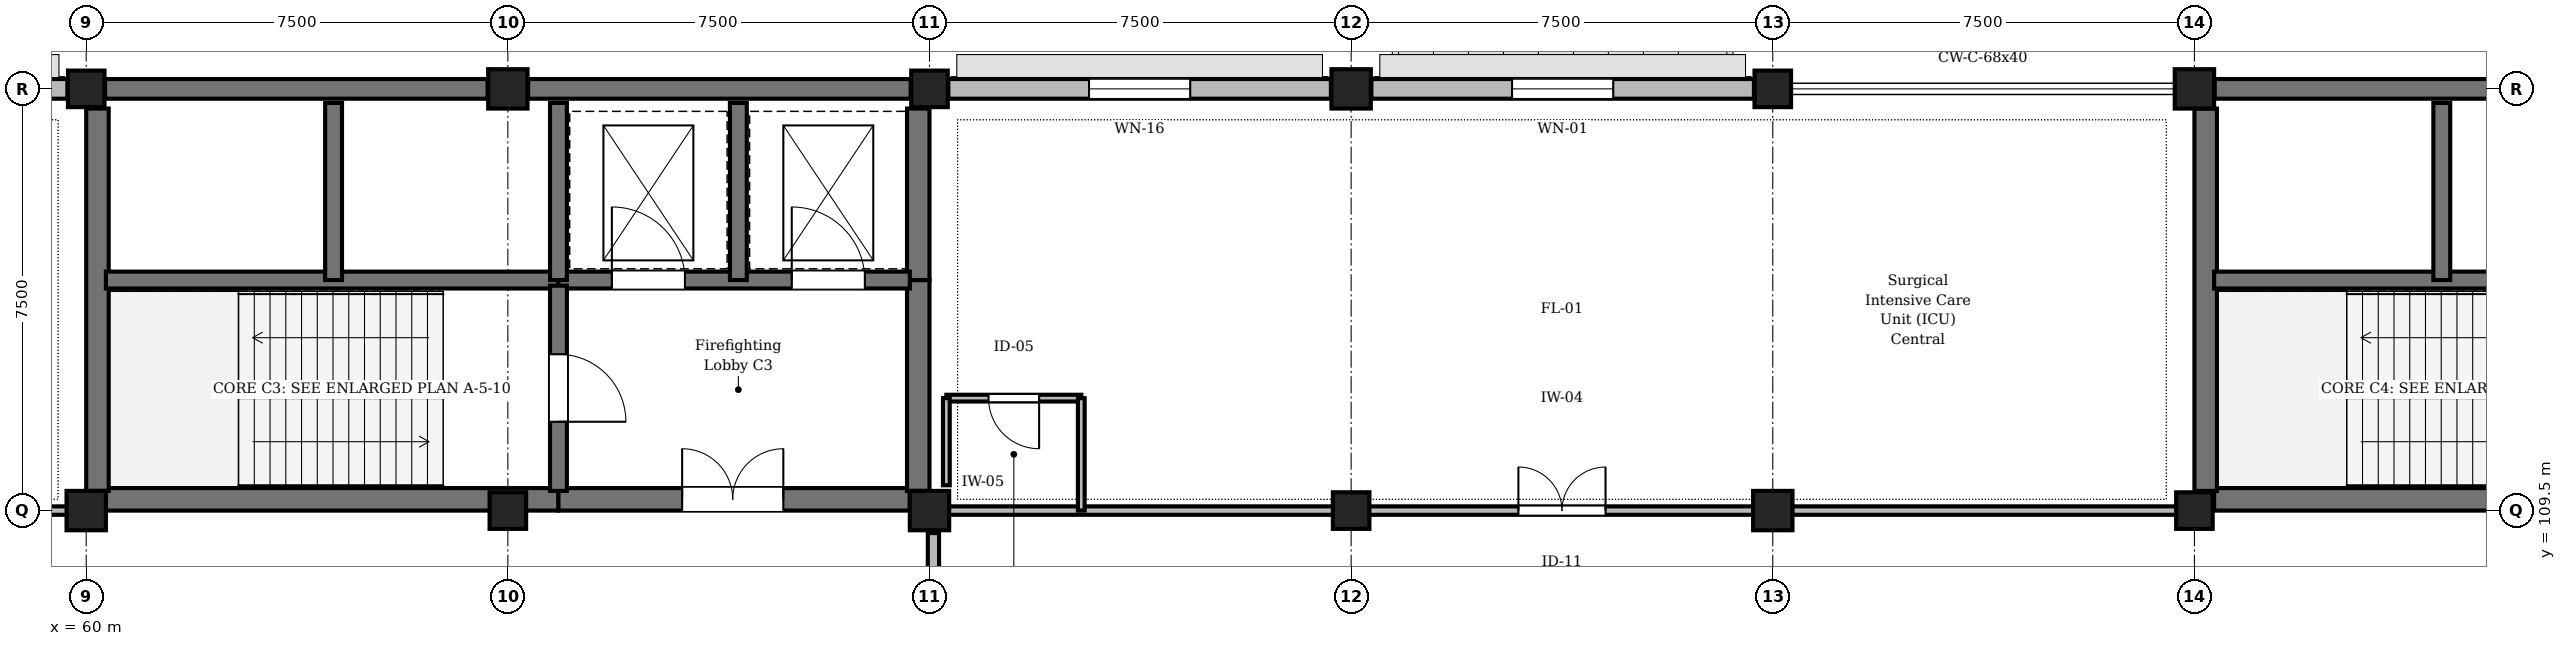
"""IFC4 building model, lengths in metres.
Left out: names, types, materials, properties, quantities, classifications, styles, units other than length and angle.
Written with IfcOpenShell. Run it as: python <this file> out.ifc"""

import sys

from ifc_helpers import new_model, si_unit, direction, frame, frame_2d, origin, origin_2d, place, context, subcontext, project, spatial, rectangle, extrude, element, fill, save


model = new_model("IFC4")
c1 = context("Model", 3, precision=1e-05, world=origin(), true_north=direction((0.0, 1.0)))
c2 = subcontext(c1, "Body", "Model", "MODEL_VIEW")
j1 = project(units=[si_unit("LENGTHUNIT", "METRE"), si_unit("PLANEANGLEUNIT", "RADIAN")], contexts=[c1])
p1 = place(None, origin())
s1 = spatial("IfcSite", under=j1, at=p1, CompositionType="ELEMENT")
p2 = place(p1, origin())
s2 = spatial("IfcBuilding", under=s1, at=p2, CompositionType="ELEMENT")
p3 = place(p2, frame((0.0, 0.0, 9.3)))
s3 = spatial("IfcBuildingStorey", under=s2, at=p3, CompositionType="ELEMENT", Elevation=9.3)
p4 = place(p3, frame((60.0, 109.5, 0.0), z_axis=(0.0, 0.0, 1.0), x_axis=(1.0, 0.0, 0.0)))
e1 = element("IfcColumn", 1, at=p4, inside=s3, PredefinedType="COLUMN", context=c2, shape_type="SweptSolid", body=[
    extrude(rectangle(XDim=0.7, YDim=0.7, at=origin_2d()), origin(), (0.0, 0.0, 1.0), 4.8),
])
for number, where, z_axis, x_axis in (
    (2, (60.0, 117.0, 0.0), (0.0, 0.0, 1.0), (1.0, 0.0, 0.0)),
    (3, (67.5, 109.5, 0.0), (0.0, 0.0, 1.0), (1.0, 0.0, 0.0)),
):
    element("IfcColumn", number, at=place(p3, frame(where, z_axis=z_axis, x_axis=x_axis)), inside=s3, PredefinedType="COLUMN", context=c2, shape_type="SweptSolid", body=[
        extrude(rectangle(XDim=0.65, YDim=0.65, at=origin_2d()), origin(), (0.0, 0.0, 1.0), 4.8),
    ])
for number, where, z_axis, x_axis in (
    (4, (67.5, 117.0, 0.0), (0.0, 0.0, 1.0), (1.0, 0.0, 0.0)),
    (5, (75.0, 109.5, 0.0), (0.0, 0.0, 1.0), (1.0, 0.0, 0.0)),
):
    element("IfcColumn", number, at=place(p3, frame(where, z_axis=z_axis, x_axis=x_axis)), inside=s3, PredefinedType="COLUMN", context=c2, shape_type="SweptSolid", body=[
        extrude(rectangle(XDim=0.7, YDim=0.7, at=origin_2d()), origin(), (0.0, 0.0, 1.0), 4.8),
    ])
for number, where, z_axis, x_axis in (
    (6, (75.0, 117.0, 0.0), (0.0, 0.0, 1.0), (1.0, 0.0, 0.0)),
    (7, (82.5, 109.5, 0.0), (0.0, 0.0, 1.0), (1.0, 0.0, 0.0)),
):
    element("IfcColumn", number, at=place(p3, frame(where, z_axis=z_axis, x_axis=x_axis)), inside=s3, PredefinedType="COLUMN", context=c2, shape_type="SweptSolid", body=[
        extrude(rectangle(XDim=0.65, YDim=0.65, at=origin_2d()), origin(), (0.0, 0.0, 1.0), 4.8),
    ])
for number, where, z_axis, x_axis in (
    (8, (82.5, 117.0, 0.0), (0.0, 0.0, 1.0), (1.0, 0.0, 0.0)),
    (9, (90.0, 109.5, 0.0), (0.0, 0.0, 1.0), (1.0, 0.0, 0.0)),
):
    element("IfcColumn", number, at=place(p3, frame(where, z_axis=z_axis, x_axis=x_axis)), inside=s3, PredefinedType="COLUMN", context=c2, shape_type="SweptSolid", body=[
        extrude(rectangle(XDim=0.7, YDim=0.7, at=origin_2d()), origin(), (0.0, 0.0, 1.0), 4.8),
    ])
for number, where, z_axis, x_axis in (
    (10, (90.0, 117.0, 0.0), (0.0, 0.0, 1.0), (1.0, 0.0, 0.0)),
    (11, (97.5, 109.5, 0.0), (0.0, 0.0, 1.0), (1.0, 0.0, 0.0)),
):
    element("IfcColumn", number, at=place(p3, frame(where, z_axis=z_axis, x_axis=x_axis)), inside=s3, PredefinedType="COLUMN", context=c2, shape_type="SweptSolid", body=[
        extrude(rectangle(XDim=0.65, YDim=0.65, at=origin_2d()), origin(), (0.0, 0.0, 1.0), 4.8),
    ])
p5 = place(p3, frame((97.5, 117.0, 0.0), z_axis=(0.0, 0.0, 1.0), x_axis=(1.0, 0.0, 0.0)))
e12 = element("IfcColumn", 12, at=p5, inside=s3, PredefinedType="COLUMN", context=c2, shape_type="SweptSolid", body=[
    extrude(rectangle(XDim=0.7, YDim=0.7, at=origin_2d()), origin(), (0.0, 0.0, 1.0), 4.8),
])
p6 = place(p3, frame((52.81, 117.0, 0.0), z_axis=(0.0, 0.0, 1.0), x_axis=(1.0, 0.0, 0.0)))
e13 = element("IfcWall", 13, at=p6, inside=s3, PredefinedType="STANDARD", context=c2, shape_type="SweptSolid", body=[
    extrude(rectangle(XDim=6.855, YDim=0.35, at=frame_2d((3.427, 0.0))), origin(), (0.0, 0.0, 1.0), 3.95),
])
p7 = place(p6, frame((2.327, 0.0, 0.9)))
e14 = element("IfcOpeningElement", 14, at=p7, cuts=e13, PredefinedType="OPENING", context=c2, shape_type="SweptSolid", body=[
    extrude(rectangle(XDim=2.2, YDim=1.95, at=frame_2d((1.1, 0.975))), frame((0.0, 0.185, 0.0), z_axis=(0.0, -1.0, 0.0), x_axis=(1.0, 0.0, 0.0)), (0.0, 0.0, 1.0), 0.37),
])
for number, where, z_axis, x_axis in (
    (15, (60.335, 117.0, 0.0), (0.0, 0.0, 1.0), (1.0, 0.0, 0.0)),
    (16, (67.86, 117.0, 0.0), (0.0, 0.0, 1.0), (1.0, 0.0, 0.0)),
):
    element("IfcWall", number, at=place(p3, frame(where, z_axis=z_axis, x_axis=x_axis)), inside=s3, PredefinedType="SHEAR", context=c2, shape_type="SweptSolid", body=[
        extrude(rectangle(XDim=6.805, YDim=0.35, at=frame_2d((3.402, 0.0))), origin(), (0.0, 0.0, 1.0), 4.55),
    ])
p8 = place(p3, frame((75.335, 117.0, 0.0), z_axis=(0.0, 0.0, 1.0), x_axis=(1.0, 0.0, 0.0)))
e17 = element("IfcWall", 17, at=p8, inside=s3, PredefinedType="STANDARD", context=c2, shape_type="SweptSolid", body=[
    extrude(rectangle(XDim=6.805, YDim=0.35, at=frame_2d((3.402, 0.0))), origin(), (0.0, 0.0, 1.0), 3.95),
])
p9 = place(p8, frame((2.502, 0.0, 0.9)))
e18 = element("IfcOpeningElement", 18, at=p9, cuts=e17, PredefinedType="OPENING", context=c2, shape_type="SweptSolid", body=[
    extrude(rectangle(XDim=1.8, YDim=1.8, at=frame_2d((0.9, 0.9))), frame((0.0, 0.185, 0.0), z_axis=(0.0, -1.0, 0.0), x_axis=(1.0, 0.0, 0.0)), (0.0, 0.0, 1.0), 0.37),
])
p10 = place(p3, frame((82.86, 117.0, 0.0), z_axis=(0.0, 0.0, 1.0), x_axis=(1.0, 0.0, 0.0)))
e19 = element("IfcWall", 19, at=p10, inside=s3, PredefinedType="STANDARD", context=c2, shape_type="SweptSolid", body=[
    extrude(rectangle(XDim=6.805, YDim=0.35, at=frame_2d((3.402, 0.0))), origin(), (0.0, 0.0, 1.0), 3.95),
])
p11 = place(p10, frame((2.502, 0.0, 0.9)))
e20 = element("IfcOpeningElement", 20, at=p11, cuts=e19, PredefinedType="OPENING", context=c2, shape_type="SweptSolid", body=[
    extrude(rectangle(XDim=1.8, YDim=2.4, at=frame_2d((0.9, 1.2))), frame((0.0, 0.185, 0.0), z_axis=(0.0, -1.0, 0.0), x_axis=(1.0, 0.0, 0.0)), (0.0, 0.0, 1.0), 0.37),
])
p12 = place(p3, frame((97.86, 117.0, 0.0), z_axis=(0.0, 0.0, 1.0), x_axis=(1.0, 0.0, 0.0)))
e21 = element("IfcWall", 21, at=p12, inside=s3, PredefinedType="SHEAR", context=c2, shape_type="SweptSolid", body=[
    extrude(rectangle(XDim=6.805, YDim=0.35, at=frame_2d((3.402, 0.0))), origin(), (0.0, 0.0, 1.0), 4.55),
])
p13 = place(p3, frame((60.35, 109.7, 0.0), z_axis=(0.0, 0.0, 1.0), x_axis=(1.0, 0.0, 0.0)))
e22 = element("IfcWall", 22, at=p13, inside=s3, PredefinedType="SHEAR", context=c2, shape_type="SweptSolid", body=[
    extrude(rectangle(XDim=8.05, YDim=0.4, at=frame_2d((4.025, 0.0))), origin(), (0.0, 0.0, 1.0), 4.55),
])
p14 = place(p3, frame((68.4, 109.7, 0.0), z_axis=(0.0, 0.0, 1.0), x_axis=(1.0, 0.0, 0.0)))
e23 = element("IfcWall", 23, at=p14, inside=s3, PredefinedType="SHEAR", context=c2, shape_type="SweptSolid", body=[
    extrude(rectangle(XDim=6.25, YDim=0.4, at=frame_2d((3.125, 0.0))), origin(), (0.0, 0.0, 1.0), 4.55),
])
p15 = place(p14, frame((2.2, 0.0, 0.0)))
e24 = element("IfcOpeningElement", 24, at=p15, cuts=e23, PredefinedType="OPENING", context=c2, shape_type="SweptSolid", body=[
    extrude(rectangle(XDim=1.8, YDim=2.25, at=frame_2d((0.9, 1.125))), frame((0.0, 0.21, 0.0), z_axis=(0.0, -1.0, 0.0), x_axis=(1.0, 0.0, 0.0)), (0.0, 0.0, 1.0), 0.42),
])
p16 = place(p3, frame((60.2, 109.85, 0.0), z_axis=(0.0, 0.0, 1.0), x_axis=(0.0, 1.0, 0.0)))
e25 = element("IfcWall", 25, at=p16, inside=s3, PredefinedType="SHEAR", context=c2, shape_type="SweptSolid", body=[
    extrude(rectangle(XDim=6.8, YDim=0.4, at=frame_2d((3.4, 0.0))), origin(), (0.0, 0.0, 1.0), 4.55),
])
p17 = place(p3, frame((74.8, 109.85, 0.0), z_axis=(0.0, 0.0, 1.0), x_axis=(0.0, 1.0, 0.0)))
e26 = element("IfcWall", 26, at=p17, inside=s3, PredefinedType="SHEAR", context=c2, shape_type="SweptSolid", body=[
    extrude(rectangle(XDim=3.75, YDim=0.4, at=frame_2d((1.875, 0.0))), origin(), (0.0, 0.0, 1.0), 4.55),
])
p18 = place(p3, frame((74.8, 113.6, 0.0), z_axis=(0.0, 0.0, 1.0), x_axis=(0.0, 1.0, 0.0)))
e27 = element("IfcWall", 27, at=p18, inside=s3, PredefinedType="SHEAR", context=c2, shape_type="SweptSolid", body=[
    extrude(rectangle(XDim=3.05, YDim=0.4, at=frame_2d((1.525, 0.0))), origin(), (0.0, 0.0, 1.0), 4.55),
])
p19 = place(p3, frame((60.35, 113.6, 0.0), z_axis=(0.0, 0.0, 1.0), x_axis=(1.0, 0.0, 0.0)))
e28 = element("IfcWall", 28, at=p19, inside=s3, PredefinedType="SHEAR", context=c2, shape_type="SweptSolid", body=[
    extrude(rectangle(XDim=8.05, YDim=0.3, at=frame_2d((4.025, 0.0))), origin(), (0.0, 0.0, 1.0), 4.55),
])
p20 = place(p3, frame((68.4, 113.6, 0.0), z_axis=(0.0, 0.0, 1.0), x_axis=(1.0, 0.0, 0.0)))
e29 = element("IfcWall", 29, at=p20, inside=s3, PredefinedType="SHEAR", context=c2, shape_type="SweptSolid", body=[
    extrude(rectangle(XDim=6.25, YDim=0.3, at=frame_2d((3.125, 0.0))), origin(), (0.0, 0.0, 1.0), 4.55),
])
p21 = place(p20, frame((0.95, 0.0, 0.0)))
e30 = element("IfcOpeningElement", 30, at=p21, cuts=e29, PredefinedType="OPENING", context=c2, shape_type="SweptSolid", body=[
    extrude(rectangle(XDim=1.3, YDim=2.2, at=frame_2d((0.65, 1.1))), frame((0.0, 0.16, 0.0), z_axis=(0.0, -1.0, 0.0), x_axis=(1.0, 0.0, 0.0)), (0.0, 0.0, 1.0), 0.32),
])
p22 = place(p20, frame((4.15, 0.0, 0.0)))
e31 = element("IfcOpeningElement", 31, at=p22, cuts=e29, PredefinedType="OPENING", context=c2, shape_type="SweptSolid", body=[
    extrude(rectangle(XDim=1.3, YDim=2.2, at=frame_2d((0.65, 1.1))), frame((0.0, 0.16, 0.0), z_axis=(0.0, -1.0, 0.0), x_axis=(1.0, 0.0, 0.0)), (0.0, 0.0, 1.0), 0.32),
])
p23 = place(p3, frame((68.4, 113.5, 0.0), z_axis=(0.0, 0.0, 1.0), x_axis=(0.0, -1.0, 0.0)))
e32 = element("IfcWall", 32, at=p23, inside=s3, PredefinedType="SHEAR", context=c2, shape_type="SweptSolid", body=[
    extrude(rectangle(XDim=3.65, YDim=0.3, at=frame_2d((1.825, 0.0))), origin(), (0.0, 0.0, 1.0), 4.55),
])
p24 = place(p23, frame((1.22, 0.0, 0.0)))
e33 = element("IfcOpeningElement", 33, at=p24, cuts=e32, PredefinedType="OPENING", context=c2, shape_type="SweptSolid", body=[
    extrude(rectangle(XDim=1.2, YDim=2.25, at=frame_2d((0.6, 1.125))), frame((0.0, 0.16, 0.0), z_axis=(0.0, -1.0, 0.0), x_axis=(1.0, 0.0, 0.0)), (0.0, 0.0, 1.0), 0.32),
])
for number, where, z_axis, x_axis in (
    (34, (64.4, 113.6, 0.0), (0.0, 0.0, 1.0), (0.0, 1.0, 0.0)),
    (35, (68.4, 113.6, 0.0), (0.0, 0.0, 1.0), (0.0, 1.0, 0.0)),
    (36, (71.6, 113.6, 0.0), (0.0, 0.0, 1.0), (0.0, 1.0, 0.0)),
):
    element("IfcWall", number, at=place(p3, frame(where, z_axis=z_axis, x_axis=x_axis)), inside=s3, PredefinedType="SHEAR", context=c2, shape_type="SweptSolid", body=[
        extrude(rectangle(XDim=3.15, YDim=0.3, at=frame_2d((1.575, 0.0))), origin(), (0.0, 0.0, 1.0), 4.55),
    ])
p25 = place(p3, frame((97.85, 109.7, 0.0), z_axis=(0.0, 0.0, 1.0), x_axis=(1.0, 0.0, 0.0)))
e37 = element("IfcWall", 37, at=p25, inside=s3, PredefinedType="SHEAR", context=c2, shape_type="SweptSolid", body=[
    extrude(rectangle(XDim=8.05, YDim=0.4, at=frame_2d((4.025, 0.0))), origin(), (0.0, 0.0, 1.0), 4.55),
])
p26 = place(p3, frame((97.7, 109.85, 0.0), z_axis=(0.0, 0.0, 1.0), x_axis=(0.0, 1.0, 0.0)))
e38 = element("IfcWall", 38, at=p26, inside=s3, PredefinedType="SHEAR", context=c2, shape_type="SweptSolid", body=[
    extrude(rectangle(XDim=6.8, YDim=0.4, at=frame_2d((3.4, 0.0))), origin(), (0.0, 0.0, 1.0), 4.55),
])
p27 = place(p3, frame((97.85, 113.6, 0.0), z_axis=(0.0, 0.0, 1.0), x_axis=(1.0, 0.0, 0.0)))
e39 = element("IfcWall", 39, at=p27, inside=s3, PredefinedType="SHEAR", context=c2, shape_type="SweptSolid", body=[
    extrude(rectangle(XDim=8.05, YDim=0.3, at=frame_2d((4.025, 0.0))), origin(), (0.0, 0.0, 1.0), 4.55),
])
p28 = place(p3, frame((101.9, 113.6, 0.0), z_axis=(0.0, 0.0, 1.0), x_axis=(0.0, 1.0, 0.0)))
e40 = element("IfcWall", 40, at=p28, inside=s3, PredefinedType="SHEAR", context=c2, shape_type="SweptSolid", body=[
    extrude(rectangle(XDim=3.15, YDim=0.3, at=frame_2d((1.575, 0.0))), origin(), (0.0, 0.0, 1.0), 4.55),
])
p29 = place(p3, frame((45.35, 109.5, 0.0), z_axis=(0.0, 0.0, 1.0), x_axis=(1.0, 0.0, 0.0)))
e41 = element("IfcWall", 41, at=p29, inside=s3, PredefinedType="PARTITIONING", context=c2, shape_type="SweptSolid", body=[
    extrude(rectangle(XDim=14.35, YDim=0.15, at=frame_2d((7.175, 0.0))), origin(), (0.0, 0.0, 1.0), 3.985),
])
p30 = place(p29, frame((10.09, 0.0, 0.0)))
e42 = element("IfcOpeningElement", 42, at=p30, cuts=e41, PredefinedType="OPENING", context=c2, shape_type="SweptSolid", body=[
    extrude(rectangle(XDim=1.55, YDim=2.35, at=frame_2d((0.775, 1.175))), frame((0.0, 0.085, 0.0), z_axis=(0.0, -1.0, 0.0), x_axis=(1.0, 0.0, 0.0)), (0.0, 0.0, 1.0), 0.17),
])
p31 = place(p3, frame((75.3, 109.5, 0.0), z_axis=(0.0, 0.0, 1.0), x_axis=(1.0, 0.0, 0.0)))
e43 = element("IfcWall", 43, at=p31, inside=s3, PredefinedType="PARTITIONING", context=c2, shape_type="SweptSolid", body=[
    extrude(rectangle(XDim=21.9, YDim=0.15, at=frame_2d((10.95, 0.0))), origin(), (0.0, 0.0, 1.0), 3.985),
])
p32 = place(p31, frame((10.175, 0.0, 0.0)))
e44 = element("IfcOpeningElement", 44, at=p32, cuts=e43, PredefinedType="OPENING", context=c2, shape_type="SweptSolid", body=[
    extrude(rectangle(XDim=1.55, YDim=2.35, at=frame_2d((0.775, 1.175))), frame((0.0, 0.085, 0.0), z_axis=(0.0, -1.0, 0.0), x_axis=(1.0, 0.0, 0.0)), (0.0, 0.0, 1.0), 0.17),
])
p33 = place(p3, frame((77.7, 111.5, 0.0), z_axis=(0.0, 0.0, 1.0), x_axis=(-1.0, 0.0, 0.0)))
e45 = element("IfcWall", 45, at=p33, inside=s3, PredefinedType="PARTITIONING", context=c2, shape_type="SweptSolid", body=[
    extrude(rectangle(XDim=2.4, YDim=0.12, at=frame_2d((1.2, 0.0))), origin(), (0.0, 0.0, 1.0), 4.535),
])
p34 = place(p33, frame((0.75, 0.0, 0.0)))
e46 = element("IfcOpeningElement", 46, at=p34, cuts=e45, PredefinedType="OPENING", context=c2, shape_type="SweptSolid", body=[
    extrude(rectangle(XDim=0.9, YDim=2.1, at=frame_2d((0.45, 1.05))), frame((0.0, 0.07, 0.0), z_axis=(0.0, -1.0, 0.0), x_axis=(1.0, 0.0, 0.0)), (0.0, 0.0, 1.0), 0.14),
])
p35 = place(p3, frame((77.7, 109.5, 0.0), z_axis=(0.0, 0.0, 1.0), x_axis=(0.0, 1.0, 0.0)))
e47 = element("IfcWall", 47, at=p35, inside=s3, PredefinedType="PARTITIONING", context=c2, shape_type="SweptSolid", body=[
    extrude(rectangle(XDim=2.0, YDim=0.12, at=frame_2d((1.0, 0.0))), origin(), (0.0, 0.0, 1.0), 4.535),
])
p36 = place(p3, frame((75.3, 109.95, 0.0), z_axis=(0.0, 0.0, 1.0), x_axis=(0.0, 1.0, 0.0)))
e48 = element("IfcWall", 48, at=p36, inside=s3, PredefinedType="PARTITIONING", context=c2, shape_type="SweptSolid", body=[
    extrude(rectangle(XDim=1.55, YDim=0.12, at=frame_2d((0.775, 0.0))), origin(), (0.0, 0.0, 1.0), 3.985),
])
p37 = place(p3, frame((75.07, 105.8, 0.0), z_axis=(0.0, 0.0, 1.0), x_axis=(0.0, 1.0, 0.0)))
e49 = element("IfcWall", 49, at=p37, inside=s3, PredefinedType="STANDARD", context=c2, shape_type="SweptSolid", body=[
    extrude(rectangle(XDim=3.3, YDim=0.2, at=frame_2d((1.65, 0.0))), origin(), (0.0, 0.0, 1.0), 3.835),
])
p38 = place(p37, frame((0.65, 0.0, 0.0)))
e50 = element("IfcOpeningElement", 50, at=p38, cuts=e49, PredefinedType="OPENING", context=c2, shape_type="SweptSolid", body=[
    extrude(rectangle(XDim=2.0, YDim=2.3, at=frame_2d((1.0, 1.15))), frame((0.0, 0.11, 0.0), z_axis=(0.0, -1.0, 0.0), x_axis=(1.0, 0.0, 0.0)), (0.0, 0.0, 1.0), 0.22),
])
p39 = place(p9, origin())
e51 = element("IfcWindow", 51, at=p39, inside=s3, PartitioningType="SINGLE_PANEL", PredefinedType="WINDOW", context=c2, shape_type="SweptSolid", body=[
    extrude(rectangle(XDim=1.8, YDim=1.8, at=frame_2d((0.9, 0.9))), frame((0.0, 0.03, 0.0), z_axis=(0.0, -1.0, 0.0), x_axis=(1.0, 0.0, 0.0)), (0.0, 0.0, 1.0), 0.06),
])
fill(e18, e51)
p40 = place(p11, origin())
e52 = element("IfcWindow", 52, at=p40, inside=s3, PartitioningType="SINGLE_PANEL", PredefinedType="WINDOW", context=c2, shape_type="SweptSolid", body=[
    extrude(rectangle(XDim=1.8, YDim=2.4, at=frame_2d((0.9, 1.2))), frame((0.0, 0.03, 0.0), z_axis=(0.0, -1.0, 0.0), x_axis=(1.0, 0.0, 0.0)), (0.0, 0.0, 1.0), 0.06),
])
fill(e20, e52)
p41 = place(p15, origin())
e53 = element("IfcDoor", 53, at=p41, inside=s3, OperationType="DOUBLE_DOOR_SINGLE_SWING", PredefinedType="DOOR", context=c2, shape_type="SweptSolid", body=[
    extrude(rectangle(XDim=1.8, YDim=2.25, at=frame_2d((0.9, 1.125))), frame((0.0, 0.025, 0.0), z_axis=(0.0, -1.0, 0.0), x_axis=(1.0, 0.0, 0.0)), (0.0, 0.0, 1.0), 0.05),
])
fill(e24, e53)
p42 = place(p21, origin())
e54 = element("IfcDoor", 54, at=p42, inside=s3, OperationType="DOUBLE_DOOR_SLIDING", PredefinedType="DOOR", context=c2, shape_type="SweptSolid", body=[
    extrude(rectangle(XDim=1.3, YDim=2.2, at=frame_2d((0.65, 1.1))), frame((0.0, 0.025, 0.0), z_axis=(0.0, -1.0, 0.0), x_axis=(1.0, 0.0, 0.0)), (0.0, 0.0, 1.0), 0.05),
])
fill(e30, e54)
p43 = place(p22, origin())
e55 = element("IfcDoor", 55, at=p43, inside=s3, OperationType="DOUBLE_DOOR_SLIDING", PredefinedType="DOOR", context=c2, shape_type="SweptSolid", body=[
    extrude(rectangle(XDim=1.3, YDim=2.2, at=frame_2d((0.65, 1.1))), frame((0.0, 0.025, 0.0), z_axis=(0.0, -1.0, 0.0), x_axis=(1.0, 0.0, 0.0)), (0.0, 0.0, 1.0), 0.05),
])
fill(e31, e55)
p44 = place(p24, origin())
e56 = element("IfcDoor", 56, at=p44, inside=s3, OperationType="SINGLE_SWING_RIGHT", PredefinedType="DOOR", context=c2, shape_type="SweptSolid", body=[
    extrude(rectangle(XDim=1.2, YDim=2.25, at=frame_2d((0.6, 1.125))), frame((0.0, 0.025, 0.0), z_axis=(0.0, -1.0, 0.0), x_axis=(1.0, 0.0, 0.0)), (0.0, 0.0, 1.0), 0.05),
])
fill(e33, e56)
p45 = place(p32, origin())
e57 = element("IfcDoor", 57, at=p45, inside=s3, OperationType="DOUBLE_DOOR_SINGLE_SWING", PredefinedType="DOOR", context=c2, shape_type="SweptSolid", body=[
    extrude(rectangle(XDim=1.55, YDim=2.35, at=frame_2d((0.775, 1.175))), frame((0.0, 0.025, 0.0), z_axis=(0.0, -1.0, 0.0), x_axis=(1.0, 0.0, 0.0)), (0.0, 0.0, 1.0), 0.05),
])
fill(e44, e57)
p46 = place(p34, origin())
e58 = element("IfcDoor", 58, at=p46, inside=s3, OperationType="SINGLE_SWING_LEFT", PredefinedType="DOOR", context=c2, shape_type="SweptSolid", body=[
    extrude(rectangle(XDim=0.9, YDim=2.1, at=frame_2d((0.45, 1.05))), frame((0.0, 0.025, 0.0), z_axis=(0.0, -1.0, 0.0), x_axis=(1.0, 0.0, 0.0)), (0.0, 0.0, 1.0), 0.05),
])
fill(e46, e58)
save(model, sys.argv[1])
